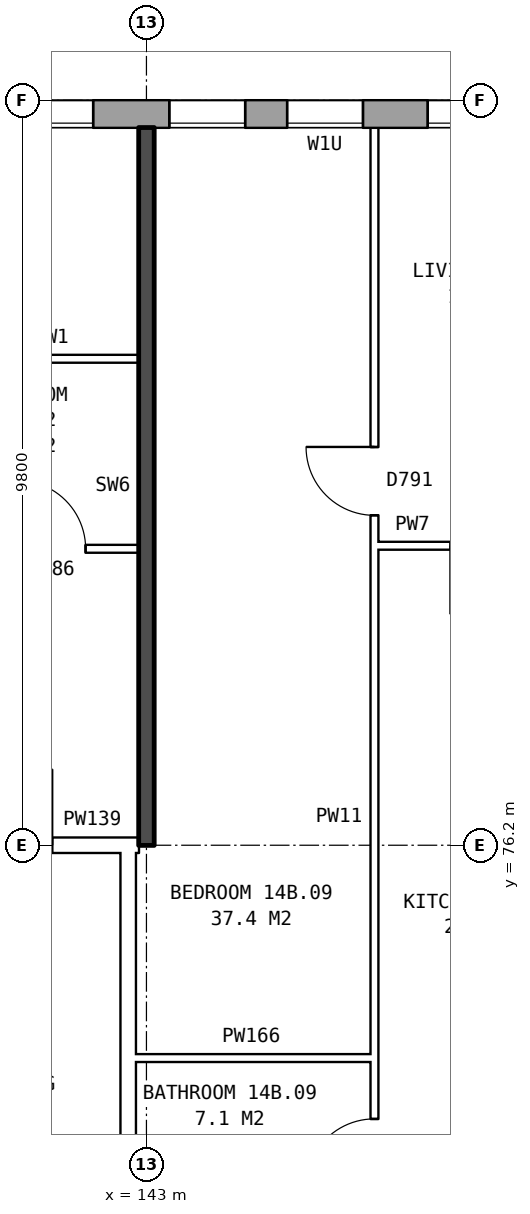
"""IFC4 building model, lengths in metres.
Left out: names, types, materials, properties, quantities, classifications, styles, units other than length and angle.
Written with IfcOpenShell. Run it as: python <this file> out.ifc"""

import sys

from ifc_helpers import new_model, si_unit, direction, frame, frame_2d, origin, place, context, subcontext, project, spatial, rectangle, extrude, element, fill, save


model = new_model("IFC4")
c1 = context("Model", 3, precision=1e-05, world=origin(), true_north=direction((0.0, 1.0)))
c2 = subcontext(c1, "Body", "Model", "MODEL_VIEW")
j1 = project(units=[si_unit("LENGTHUNIT", "METRE"), si_unit("PLANEANGLEUNIT", "RADIAN")], contexts=[c1])
p1 = place(None, origin())
s1 = spatial("IfcSite", under=j1, at=p1, CompositionType="ELEMENT")
p2 = place(p1, origin())
s2 = spatial("IfcBuilding", under=s1, at=p2, CompositionType="ELEMENT")
p3 = place(p2, frame((0.0, 0.0, 53.6)))
s3 = spatial("IfcBuildingStorey", under=s2, at=p3, CompositionType="ELEMENT", Elevation=53.6)
p4 = place(p3, frame((173.425, 85.82, 0.0), z_axis=(0.0, 0.0, 1.0), x_axis=(-1.0, 0.0, 0.0)))
e1 = element("IfcWall", 1, at=p4, inside=s3, PredefinedType="STANDARD", context=c2, shape_type="SweptSolid", body=[
    extrude(rectangle(XDim=39.351, YDim=0.36, at=frame_2d((19.675, 0.0))), origin(), (0.0, 0.0, 1.0), 2.85),
])
p5 = place(p4, frame((1.125, 0.0, 0.8)))
e2 = element("IfcOpeningElement", 2, at=p5, cuts=e1, PredefinedType="OPENING", context=c2, shape_type="SweptSolid", body=[
    extrude(rectangle(XDim=1.6, YDim=1.8, at=frame_2d((0.8, 0.9))), frame((0.0, 0.19, 0.0), z_axis=(0.0, -1.0, 0.0), x_axis=(1.0, 0.0, 0.0)), (0.0, 0.0, 1.0), 0.38),
])
p6 = place(p4, frame((4.125, 0.0, 0.8)))
e3 = element("IfcOpeningElement", 3, at=p6, cuts=e1, PredefinedType="OPENING", context=c2, shape_type="SweptSolid", body=[
    extrude(rectangle(XDim=1.6, YDim=1.8, at=frame_2d((0.8, 0.9))), frame((0.0, 0.19, 0.0), z_axis=(0.0, -1.0, 0.0), x_axis=(1.0, 0.0, 0.0)), (0.0, 0.0, 1.0), 0.38),
])
p7 = place(p4, frame((7.125, 0.0, 0.8)))
e4 = element("IfcOpeningElement", 4, at=p7, cuts=e1, PredefinedType="OPENING", context=c2, shape_type="SweptSolid", body=[
    extrude(rectangle(XDim=1.6, YDim=1.8, at=frame_2d((0.8, 0.9))), frame((0.0, 0.19, 0.0), z_axis=(0.0, -1.0, 0.0), x_axis=(1.0, 0.0, 0.0)), (0.0, 0.0, 1.0), 0.38),
])
p8 = place(p4, frame((9.625, 0.0, 1.65)))
e5 = element("IfcOpeningElement", 5, at=p8, cuts=e1, PredefinedType="OPENING", context=c2, shape_type="SweptSolid", body=[
    extrude(rectangle(XDim=0.6, YDim=0.9, at=frame_2d((0.3, 0.45))), frame((0.0, 0.19, 0.0), z_axis=(0.0, -1.0, 0.0), x_axis=(1.0, 0.0, 0.0)), (0.0, 0.0, 1.0), 0.38),
])
p9 = place(p4, frame((13.125, 0.0, 0.8)))
e6 = element("IfcOpeningElement", 6, at=p9, cuts=e1, PredefinedType="OPENING", context=c2, shape_type="SweptSolid", body=[
    extrude(rectangle(XDim=1.6, YDim=1.8, at=frame_2d((0.8, 0.9))), frame((0.0, 0.19, 0.0), z_axis=(0.0, -1.0, 0.0), x_axis=(1.0, 0.0, 0.0)), (0.0, 0.0, 1.0), 0.38),
])
p10 = place(p4, frame((16.125, 0.0, 0.8)))
e7 = element("IfcOpeningElement", 7, at=p10, cuts=e1, PredefinedType="OPENING", context=c2, shape_type="SweptSolid", body=[
    extrude(rectangle(XDim=1.6, YDim=1.8, at=frame_2d((0.8, 0.9))), frame((0.0, 0.19, 0.0), z_axis=(0.0, -1.0, 0.0), x_axis=(1.0, 0.0, 0.0)), (0.0, 0.0, 1.0), 0.38),
])
p11 = place(p4, frame((19.125, 0.0, 0.8)))
e8 = element("IfcOpeningElement", 8, at=p11, cuts=e1, PredefinedType="OPENING", context=c2, shape_type="SweptSolid", body=[
    extrude(rectangle(XDim=1.6, YDim=1.8, at=frame_2d((0.8, 0.9))), frame((0.0, 0.19, 0.0), z_axis=(0.0, -1.0, 0.0), x_axis=(1.0, 0.0, 0.0)), (0.0, 0.0, 1.0), 0.38),
])
p12 = place(p4, frame((22.125, 0.0, 0.8)))
e9 = element("IfcOpeningElement", 9, at=p12, cuts=e1, PredefinedType="OPENING", context=c2, shape_type="SweptSolid", body=[
    extrude(rectangle(XDim=1.6, YDim=1.8, at=frame_2d((0.8, 0.9))), frame((0.0, 0.19, 0.0), z_axis=(0.0, -1.0, 0.0), x_axis=(1.0, 0.0, 0.0)), (0.0, 0.0, 1.0), 0.38),
])
p13 = place(p4, frame((25.125, 0.0, 0.8)))
e10 = element("IfcOpeningElement", 10, at=p13, cuts=e1, PredefinedType="OPENING", context=c2, shape_type="SweptSolid", body=[
    extrude(rectangle(XDim=1.6, YDim=1.8, at=frame_2d((0.8, 0.9))), frame((0.0, 0.19, 0.0), z_axis=(0.0, -1.0, 0.0), x_axis=(1.0, 0.0, 0.0)), (0.0, 0.0, 1.0), 0.38),
])
p14 = place(p4, frame((27.575, 0.0, 0.15)))
e11 = element("IfcOpeningElement", 11, at=p14, cuts=e1, PredefinedType="OPENING", context=c2, shape_type="SweptSolid", body=[
    extrude(rectangle(XDim=1.0, YDim=0.9, at=frame_2d((0.5, 0.45))), frame((0.0, 0.19, 0.0), z_axis=(0.0, -1.0, 0.0), x_axis=(1.0, 0.0, 0.0)), (0.0, 0.0, 1.0), 0.38),
])
p15 = place(p4, frame((31.125, 0.0, 0.8)))
e12 = element("IfcOpeningElement", 12, at=p15, cuts=e1, PredefinedType="OPENING", context=c2, shape_type="SweptSolid", body=[
    extrude(rectangle(XDim=1.6, YDim=1.8, at=frame_2d((0.8, 0.9))), frame((0.0, 0.19, 0.0), z_axis=(0.0, -1.0, 0.0), x_axis=(1.0, 0.0, 0.0)), (0.0, 0.0, 1.0), 0.38),
])
p16 = place(p4, frame((34.125, 0.0, 0.8)))
e13 = element("IfcOpeningElement", 13, at=p16, cuts=e1, PredefinedType="OPENING", context=c2, shape_type="SweptSolid", body=[
    extrude(rectangle(XDim=1.6, YDim=1.8, at=frame_2d((0.8, 0.9))), frame((0.0, 0.19, 0.0), z_axis=(0.0, -1.0, 0.0), x_axis=(1.0, 0.0, 0.0)), (0.0, 0.0, 1.0), 0.38),
])
p17 = place(p4, frame((37.125, 0.0, 0.8)))
e14 = element("IfcOpeningElement", 14, at=p17, cuts=e1, PredefinedType="OPENING", context=c2, shape_type="SweptSolid", body=[
    extrude(rectangle(XDim=1.6, YDim=1.8, at=frame_2d((0.8, 0.9))), frame((0.0, 0.19, 0.0), z_axis=(0.0, -1.0, 0.0), x_axis=(1.0, 0.0, 0.0)), (0.0, 0.0, 1.0), 0.38),
])
p18 = place(p4, frame((10.975, 0.0, 0.35)))
e15 = element("IfcOpeningElement", 15, at=p18, cuts=e1, PredefinedType="OPENING", context=c2, shape_type="SweptSolid", body=[
    extrude(rectangle(XDim=1.2, YDim=0.9, at=frame_2d((0.6, 0.45))), frame((0.0, 0.19, 0.0), z_axis=(0.0, -1.0, 0.0), x_axis=(1.0, 0.0, 0.0)), (0.0, 0.0, 1.0), 0.38),
])
p19 = place(p4, frame((29.125, 0.0, 1.65)))
e16 = element("IfcOpeningElement", 16, at=p19, cuts=e1, PredefinedType="OPENING", context=c2, shape_type="SweptSolid", body=[
    extrude(rectangle(XDim=1.0, YDim=0.9, at=frame_2d((0.5, 0.45))), frame((0.0, 0.19, 0.0), z_axis=(0.0, -1.0, 0.0), x_axis=(1.0, 0.0, 0.0)), (0.0, 0.0, 1.0), 0.38),
])
p20 = place(p3, frame((142.76, 63.9, 0.0), z_axis=(0.0, 0.0, 1.0), x_axis=(0.0, 1.0, 0.0)))
e17 = element("IfcWall", 17, at=p20, inside=s3, PredefinedType="PARTITIONING", context=c2, shape_type="SweptSolid", body=[
    extrude(rectangle(XDim=12.2, YDim=0.2, at=frame_2d((6.1, 0.0))), origin(), (0.0, 0.0, 1.0), 2.85),
])
p21 = place(p20, frame((5.1, 0.0, 0.0)))
e18 = element("IfcOpeningElement", 18, at=p21, cuts=e17, PredefinedType="OPENING", context=c2, shape_type="SweptSolid", body=[
    extrude(rectangle(XDim=2.0, YDim=2.1, at=frame_2d((1.0, 1.05))), frame((0.0, 0.11, 0.0), z_axis=(0.0, -1.0, 0.0), x_axis=(1.0, 0.0, 0.0)), (0.0, 0.0, 1.0), 0.22),
])
p22 = place(p3, frame((142.76, 73.4, 0.0), z_axis=(0.0, 0.0, 1.0), x_axis=(1.0, 0.0, 0.0)))
e19 = element("IfcWall", 19, at=p22, inside=s3, PredefinedType="PARTITIONING", context=c2, shape_type="SweptSolid", body=[
    extrude(rectangle(XDim=3.24, YDim=0.1, at=frame_2d((1.62, 0.0))), origin(), (0.0, 0.0, 1.0), 2.85),
])
p23 = place(p3, frame((139.76, 76.2, 0.0), z_axis=(0.0, 0.0, 1.0), x_axis=(1.0, 0.0, 0.0)))
e20 = element("IfcWall", 20, at=p23, inside=s3, PredefinedType="PARTITIONING", context=c2, shape_type="SweptSolid", body=[
    extrude(rectangle(XDim=3.0, YDim=0.2, at=frame_2d((1.5, 0.0))), origin(), (0.0, 0.0, 1.0), 2.85),
])
p24 = place(p23, frame((1.0, 0.0, 0.0)))
e21 = element("IfcOpeningElement", 21, at=p24, cuts=e20, PredefinedType="OPENING", context=c2, shape_type="SweptSolid", body=[
    extrude(rectangle(XDim=1.0, YDim=2.1, at=frame_2d((0.5, 1.05))), frame((0.0, 0.11, 0.0), z_axis=(0.0, -1.0, 0.0), x_axis=(1.0, 0.0, 0.0)), (0.0, 0.0, 1.0), 0.22),
])
p25 = place(p3, frame((142.76, 76.2, 0.0), z_axis=(0.0, 0.0, 1.0), x_axis=(1.0, 0.0, 0.0)))
e22 = element("IfcWall", 22, at=p25, inside=s3, PredefinedType="PARTITIONING", context=c2, shape_type="SweptSolid", body=[
    extrude(rectangle(XDim=0.14, YDim=0.2, at=frame_2d((0.07, 0.0))), origin(), (0.0, 0.0, 1.0), 2.85),
])
p26 = place(p3, frame((137.1, 80.1, 0.0), z_axis=(0.0, 0.0, 1.0), x_axis=(1.0, 0.0, 0.0)))
e23 = element("IfcWall", 23, at=p26, inside=s3, PredefinedType="PARTITIONING", context=c2, shape_type="SweptSolid", body=[
    extrude(rectangle(XDim=5.8, YDim=0.1, at=frame_2d((2.9, 0.0))), origin(), (0.0, 0.0, 1.0), 2.85),
])
p27 = place(p26, frame((1.3, 0.0, 0.0)))
e24 = element("IfcOpeningElement", 24, at=p27, cuts=e23, PredefinedType="OPENING", context=c2, shape_type="SweptSolid", body=[
    extrude(rectangle(XDim=0.9, YDim=2.1, at=frame_2d((0.45, 1.05))), frame((0.0, 0.06, 0.0), z_axis=(0.0, -1.0, 0.0), x_axis=(1.0, 0.0, 0.0)), (0.0, 0.0, 1.0), 0.12),
])
p28 = place(p26, frame((4.2, 0.0, 0.0)))
e25 = element("IfcOpeningElement", 25, at=p28, cuts=e23, PredefinedType="OPENING", context=c2, shape_type="SweptSolid", body=[
    extrude(rectangle(XDim=0.9, YDim=2.1, at=frame_2d((0.45, 1.05))), frame((0.0, 0.06, 0.0), z_axis=(0.0, -1.0, 0.0), x_axis=(1.0, 0.0, 0.0)), (0.0, 0.0, 1.0), 0.12),
])
p29 = place(p3, frame((146.0, 80.14, 0.0), z_axis=(0.0, 0.0, 1.0), x_axis=(1.0, 0.0, 0.0)))
e26 = element("IfcWall", 26, at=p29, inside=s3, PredefinedType="PARTITIONING", context=c2, shape_type="SweptSolid", body=[
    extrude(rectangle(XDim=2.9, YDim=0.1, at=frame_2d((1.45, 0.0))), origin(), (0.0, 0.0, 1.0), 2.85),
])
p30 = place(p29, frame((1.0, 0.0, 0.0)))
e27 = element("IfcOpeningElement", 27, at=p30, cuts=e26, PredefinedType="OPENING", context=c2, shape_type="SweptSolid", body=[
    extrude(rectangle(XDim=0.9, YDim=2.1, at=frame_2d((0.45, 1.05))), frame((0.0, 0.06, 0.0), z_axis=(0.0, -1.0, 0.0), x_axis=(1.0, 0.0, 0.0)), (0.0, 0.0, 1.0), 0.12),
])
p31 = place(p3, frame((140.6, 82.6, 0.0), z_axis=(0.0, 0.0, 1.0), x_axis=(1.0, 0.0, 0.0)))
e28 = element("IfcWall", 28, at=p31, inside=s3, PredefinedType="PARTITIONING", context=c2, shape_type="SweptSolid", body=[
    extrude(rectangle(XDim=2.3, YDim=0.1, at=frame_2d((1.15, 0.0))), origin(), (0.0, 0.0, 1.0), 2.85),
])
p32 = place(p3, frame((143.0, 76.2, 0.0), z_axis=(0.0, 0.0, 1.0), x_axis=(0.0, 1.0, 0.0)))
e29 = element("IfcWall", 29, at=p32, inside=s3, PredefinedType="SOLIDWALL", context=c2, shape_type="SweptSolid", body=[
    extrude(rectangle(XDim=9.44, YDim=0.2, at=frame_2d((4.72, 0.0))), origin(), (0.0, 0.0, 1.0), 2.85),
])
p33 = place(p3, frame((146.0, 71.3, 0.0), z_axis=(0.0, 0.0, 1.0), x_axis=(0.0, 1.0, 0.0)))
e30 = element("IfcWall", 30, at=p33, inside=s3, PredefinedType="PARTITIONING", context=c2, shape_type="SweptSolid", body=[
    extrude(rectangle(XDim=14.34, YDim=0.1, at=frame_2d((7.17, 0.0))), origin(), (0.0, 0.0, 1.0), 2.85),
])
p34 = place(p33, frame((9.24, 0.0, 0.0)))
e31 = element("IfcOpeningElement", 31, at=p34, cuts=e30, PredefinedType="OPENING", context=c2, shape_type="SweptSolid", body=[
    extrude(rectangle(XDim=0.9, YDim=2.1, at=frame_2d((0.45, 1.05))), frame((0.0, 0.06, 0.0), z_axis=(0.0, -1.0, 0.0), x_axis=(1.0, 0.0, 0.0)), (0.0, 0.0, 1.0), 0.12),
])
p35 = place(p33, frame((0.4, 0.0, 0.0)))
e32 = element("IfcOpeningElement", 32, at=p35, cuts=e30, PredefinedType="OPENING", context=c2, shape_type="SweptSolid", body=[
    extrude(rectangle(XDim=0.9, YDim=2.1, at=frame_2d((0.45, 1.05))), frame((0.0, 0.06, 0.0), z_axis=(0.0, -1.0, 0.0), x_axis=(1.0, 0.0, 0.0)), (0.0, 0.0, 1.0), 0.12),
])
p36 = place(p13, origin())
e33 = element("IfcWindow", 33, at=p36, inside=s3, PartitioningType="SINGLE_PANEL", PredefinedType="WINDOW", context=c2, shape_type="SweptSolid", body=[
    extrude(rectangle(XDim=1.6, YDim=1.8, at=frame_2d((0.8, 0.9))), frame((0.0, 0.15, 0.0), z_axis=(0.0, -1.0, 0.0), x_axis=(1.0, 0.0, 0.0)), (0.0, 0.0, 1.0), 0.06),
])
fill(e10, e33)
p37 = place(p14, origin())
e34 = element("IfcWindow", 34, at=p37, inside=s3, PartitioningType="SINGLE_PANEL", PredefinedType="WINDOW", context=c2, shape_type="SweptSolid", body=[
    extrude(rectangle(XDim=1.0, YDim=0.9, at=frame_2d((0.5, 0.45))), frame((0.0, 0.15, 0.0), z_axis=(0.0, -1.0, 0.0), x_axis=(1.0, 0.0, 0.0)), (0.0, 0.0, 1.0), 0.06),
])
fill(e11, e34)
p38 = place(p15, origin())
e35 = element("IfcWindow", 35, at=p38, inside=s3, PartitioningType="SINGLE_PANEL", PredefinedType="WINDOW", context=c2, shape_type="SweptSolid", body=[
    extrude(rectangle(XDim=1.6, YDim=1.8, at=frame_2d((0.8, 0.9))), frame((0.0, 0.15, 0.0), z_axis=(0.0, -1.0, 0.0), x_axis=(1.0, 0.0, 0.0)), (0.0, 0.0, 1.0), 0.06),
])
fill(e12, e35)
p39 = place(p28, origin())
e36 = element("IfcDoor", 36, at=p39, inside=s3, OperationType="SINGLE_SWING_LEFT", PredefinedType="DOOR", context=c2, shape_type="SweptSolid", body=[
    extrude(rectangle(XDim=0.9, YDim=2.1, at=frame_2d((0.45, 1.05))), frame((0.0, 0.025, 0.0), z_axis=(0.0, -1.0, 0.0), x_axis=(1.0, 0.0, 0.0)), (0.0, 0.0, 1.0), 0.05),
])
fill(e25, e36)
p40 = place(p34, origin())
e37 = element("IfcDoor", 37, at=p40, inside=s3, OperationType="SINGLE_SWING_RIGHT", PredefinedType="DOOR", context=c2, shape_type="SweptSolid", body=[
    extrude(rectangle(XDim=0.9, YDim=2.1, at=frame_2d((0.45, 1.05))), frame((0.0, 0.025, 0.0), z_axis=(0.0, -1.0, 0.0), x_axis=(1.0, 0.0, 0.0)), (0.0, 0.0, 1.0), 0.05),
])
fill(e31, e37)
p41 = place(p35, origin())
e38 = element("IfcDoor", 38, at=p41, inside=s3, OperationType="SINGLE_SWING_LEFT", PredefinedType="DOOR", context=c2, shape_type="SweptSolid", body=[
    extrude(rectangle(XDim=0.9, YDim=2.1, at=frame_2d((0.45, 1.05))), frame((0.0, 0.025, 0.0), z_axis=(0.0, -1.0, 0.0), x_axis=(1.0, 0.0, 0.0)), (0.0, 0.0, 1.0), 0.05),
])
fill(e32, e38)
p42 = place(p19, origin())
e39 = element("IfcWindow", 39, at=p42, inside=s3, PartitioningType="SINGLE_PANEL", PredefinedType="WINDOW", context=c2, shape_type="SweptSolid", body=[
    extrude(rectangle(XDim=1.0, YDim=0.9, at=frame_2d((0.5, 0.45))), frame((0.0, 0.15, 0.0), z_axis=(0.0, -1.0, 0.0), x_axis=(1.0, 0.0, 0.0)), (0.0, 0.0, 1.0), 0.06),
])
fill(e16, e39)
save(model, sys.argv[1])
